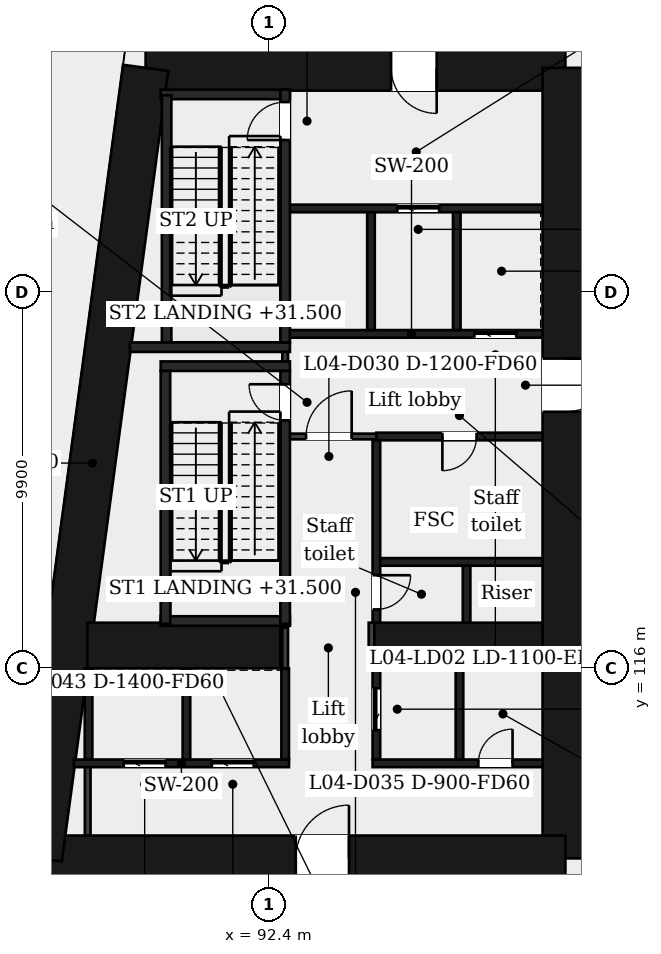
"""IFC4 building model, lengths in metres.
Left out: names, types, materials, properties, quantities, classifications, styles, units other than length and angle.
Written with IfcOpenShell. Run it as: python <this file> out.ifc"""

import sys

from ifc_helpers import new_model, si_unit, direction, frame, frame_2d, origin, place, context, subcontext, project, spatial, rectangle, extrude, element, fill, save


model = new_model("IFC4")
c1 = context("Model", 3, precision=1e-05, world=origin(), true_north=direction((0.0, 1.0)))
c2 = subcontext(c1, "Body", "Model", "MODEL_VIEW")
j1 = project(units=[si_unit("LENGTHUNIT", "METRE"), si_unit("PLANEANGLEUNIT", "RADIAN")], contexts=[c1])
p1 = place(None, origin())
s1 = spatial("IfcSite", under=j1, at=p1, CompositionType="ELEMENT")
p2 = place(p1, origin())
s2 = spatial("IfcBuilding", under=s1, at=p2, CompositionType="ELEMENT")
p3 = place(p2, frame((0.0, 0.0, 29.0)))
s3 = spatial("IfcBuildingStorey", under=s2, at=p3, CompositionType="ELEMENT", Elevation=29.0)
p4 = place(p3, frame((89.156, 131.8, 0.0), z_axis=(0.0, 0.0, 1.0), x_axis=(1.0, 0.0, 0.0)))
e1 = element("IfcWall", 1, at=p4, inside=s3, PredefinedType="SHEAR", context=c2, shape_type="SweptSolid", body=[
    extrude(rectangle(XDim=11.044, YDim=1.2, at=frame_2d((5.522, 0.0))), origin(), (0.0, 0.0, 1.0), 5.0),
])
p5 = place(p4, frame((6.458, 0.0, 0.0)))
e2 = element("IfcOpeningElement", 2, at=p5, cuts=e1, PredefinedType="OPENING", context=c2, shape_type="SweptSolid", body=[
    extrude(rectangle(XDim=1.2, YDim=2.1, at=frame_2d((0.6, 1.05))), frame((0.0, 0.61, 0.0), z_axis=(0.0, -1.0, 0.0), x_axis=(1.0, 0.0, 0.0)), (0.0, 0.0, 1.0), 1.22),
])
p6 = place(p3, frame((100.2, 131.8, 0.0), z_axis=(0.0, 0.0, 1.0), x_axis=(0.0, -1.0, 0.0)))
e3 = element("IfcWall", 3, at=p6, inside=s3, PredefinedType="SHEAR", context=c2, shape_type="SweptSolid", body=[
    extrude(rectangle(XDim=20.8, YDim=1.2, at=frame_2d((10.4, 0.0))), origin(), (0.0, 0.0, 1.0), 5.0),
])
p7 = place(p6, frame((7.65, 0.0, 0.0)))
e4 = element("IfcOpeningElement", 4, at=p7, cuts=e3, PredefinedType="OPENING", context=c2, shape_type="SweptSolid", body=[
    extrude(rectangle(XDim=1.4, YDim=2.1, at=frame_2d((0.7, 1.05))), frame((0.0, 0.61, 0.0), z_axis=(0.0, -1.0, 0.0), x_axis=(1.0, 0.0, 0.0)), (0.0, 0.0, 1.0), 1.22),
])
p8 = place(p3, frame((100.2, 111.0, 0.0), z_axis=(0.0, 0.0, 1.0), x_axis=(-1.0, 0.0, 0.0)))
e5 = element("IfcWall", 5, at=p8, inside=s3, PredefinedType="SHEAR", context=c2, shape_type="SweptSolid", body=[
    extrude(rectangle(XDim=13.844, YDim=1.2, at=frame_2d((6.922, 0.0))), origin(), (0.0, 0.0, 1.0), 5.0),
])
p9 = place(p8, frame((5.694, 0.0, 0.0)))
e6 = element("IfcOpeningElement", 6, at=p9, cuts=e5, PredefinedType="OPENING", context=c2, shape_type="SweptSolid", body=[
    extrude(rectangle(XDim=1.4, YDim=2.1, at=frame_2d((0.7, 1.05))), frame((0.0, 0.61, 0.0), z_axis=(0.0, -1.0, 0.0), x_axis=(1.0, 0.0, 0.0)), (0.0, 0.0, 1.0), 1.22),
])
p10 = place(p3, frame((86.355, 111.0, 0.0), z_axis=(0.0, 0.0, 1.0), x_axis=(0.133413989637, 0.99106039542, 0.0)))
e7 = element("IfcWall", 7, at=p10, inside=s3, PredefinedType="SHEAR", context=c2, shape_type="SweptSolid", body=[
    extrude(rectangle(XDim=20.988, YDim=1.2, at=frame_2d((10.494, 0.0))), origin(), (0.0, 0.0, 1.0), 5.0),
])
p11 = place(p3, frame((87.623, 116.6, 0.0), z_axis=(0.0, 0.0, 1.0), x_axis=(1.0, 0.0, 0.0)))
e8 = element("IfcWall", 8, at=p11, inside=s3, PredefinedType="SHEAR", context=c2, shape_type="SweptSolid", body=[
    extrude(rectangle(XDim=5.077, YDim=1.2, at=frame_2d((2.539, 0.0))), origin(), (0.0, 0.0, 1.0), 5.0),
])
p12 = place(p3, frame((95.1, 116.6, 0.0), z_axis=(0.0, 0.0, 1.0), x_axis=(1.0, 0.0, 0.0)))
e9 = element("IfcWall", 9, at=p12, inside=s3, PredefinedType="SHEAR", context=c2, shape_type="SweptSolid", body=[
    extrude(rectangle(XDim=4.5, YDim=1.2, at=frame_2d((2.25, 0.0))), origin(), (0.0, 0.0, 1.0), 5.0),
])
p13 = place(p3, frame((87.267, 113.5, 0.0), z_axis=(0.0, 0.0, 1.0), x_axis=(1.0, 0.0, 0.0)))
e10 = element("IfcWall", 10, at=p13, inside=s3, PredefinedType="PARTITIONING", context=c2, shape_type="SweptSolid", body=[
    extrude(rectangle(XDim=5.66, YDim=0.2, at=frame_2d((2.83, 0.0))), origin(), (0.0, 0.0, 1.0), 4.4),
])
p14 = place(p13, frame((1.312, 0.0, 0.0)))
e11 = element("IfcOpeningElement", 11, at=p14, cuts=e10, PredefinedType="OPENING", context=c2, shape_type="SweptSolid", body=[
    extrude(rectangle(XDim=1.1, YDim=2.1, at=frame_2d((0.55, 1.05))), frame((0.0, 0.11, 0.0), z_axis=(0.0, -1.0, 0.0), x_axis=(1.0, 0.0, 0.0)), (0.0, 0.0, 1.0), 0.22),
])
p15 = place(p13, frame((3.631, 0.0, 0.0)))
e12 = element("IfcOpeningElement", 12, at=p15, cuts=e10, PredefinedType="OPENING", context=c2, shape_type="SweptSolid", body=[
    extrude(rectangle(XDim=1.1, YDim=2.1, at=frame_2d((0.55, 1.05))), frame((0.0, 0.11, 0.0), z_axis=(0.0, -1.0, 0.0), x_axis=(1.0, 0.0, 0.0)), (0.0, 0.0, 1.0), 0.22),
])
p16 = place(p3, frame((95.127, 113.5, 0.0), z_axis=(0.0, 0.0, 1.0), x_axis=(1.0, 0.0, 0.0)))
e13 = element("IfcWall", 13, at=p16, inside=s3, PredefinedType="PARTITIONING", context=c2, shape_type="SweptSolid", body=[
    extrude(rectangle(XDim=4.473, YDim=0.2, at=frame_2d((2.237, 0.0))), origin(), (0.0, 0.0, 1.0), 4.4),
])
p17 = place(p16, frame((2.783, 0.0, 0.0)))
e14 = element("IfcOpeningElement", 14, at=p17, cuts=e13, PredefinedType="OPENING", context=c2, shape_type="SweptSolid", body=[
    extrude(rectangle(XDim=0.9, YDim=2.1, at=frame_2d((0.45, 1.05))), frame((0.0, 0.11, 0.0), z_axis=(0.0, -1.0, 0.0), x_axis=(1.0, 0.0, 0.0)), (0.0, 0.0, 1.0), 0.22),
])
p18 = place(p3, frame((89.552, 117.245, 0.0), z_axis=(0.0, 0.0, 1.0), x_axis=(1.0, 0.0, 0.0)))
e15 = element("IfcWall", 15, at=p18, inside=s3, PredefinedType="PARTITIONING", context=c2, shape_type="SweptSolid", body=[
    extrude(rectangle(XDim=3.4, YDim=0.25, at=frame_2d((1.7, 0.0))), origin(), (0.0, 0.0, 1.0), 4.4),
])
p19 = place(p3, frame((95.227, 118.8, 0.0), z_axis=(0.0, 0.0, 1.0), x_axis=(1.0, 0.0, 0.0)))
e16 = element("IfcWall", 16, at=p19, inside=s3, PredefinedType="PARTITIONING", context=c2, shape_type="SweptSolid", body=[
    extrude(rectangle(XDim=4.373, YDim=0.2, at=frame_2d((2.187, 0.0))), origin(), (0.0, 0.0, 1.0), 4.4),
])
p20 = place(p3, frame((95.227, 122.1, 0.0), z_axis=(0.0, 0.0, 1.0), x_axis=(1.0, 0.0, 0.0)))
e17 = element("IfcWall", 17, at=p20, inside=s3, PredefinedType="PARTITIONING", context=c2, shape_type="SweptSolid", body=[
    extrude(rectangle(XDim=4.373, YDim=0.2, at=frame_2d((2.187, 0.0))), origin(), (0.0, 0.0, 1.0), 4.4),
])
p21 = place(p20, frame((1.736, 0.0, 0.0)))
e18 = element("IfcOpeningElement", 18, at=p21, cuts=e17, PredefinedType="OPENING", context=c2, shape_type="SweptSolid", body=[
    extrude(rectangle(XDim=0.9, YDim=2.1, at=frame_2d((0.45, 1.05))), frame((0.0, 0.11, 0.0), z_axis=(0.0, -1.0, 0.0), x_axis=(1.0, 0.0, 0.0)), (0.0, 0.0, 1.0), 0.22),
])
p22 = place(p3, frame((92.827, 122.1, 0.0), z_axis=(0.0, 0.0, 1.0), x_axis=(1.0, 0.0, 0.0)))
e19 = element("IfcWall", 19, at=p22, inside=s3, PredefinedType="PARTITIONING", context=c2, shape_type="SweptSolid", body=[
    extrude(rectangle(XDim=2.4, YDim=0.15, at=frame_2d((1.2, 0.0))), origin(), (0.0, 0.0, 1.0), 4.4),
])
p23 = place(p22, frame((0.55, 0.0, 0.0)))
e20 = element("IfcOpeningElement", 20, at=p23, cuts=e19, PredefinedType="OPENING", context=c2, shape_type="SweptSolid", body=[
    extrude(rectangle(XDim=1.2, YDim=2.1, at=frame_2d((0.6, 1.05))), frame((0.0, 0.085, 0.0), z_axis=(0.0, -1.0, 0.0), x_axis=(1.0, 0.0, 0.0)), (0.0, 0.0, 1.0), 0.17),
])
p24 = place(p3, frame((89.552, 123.95, 0.0), z_axis=(0.0, 0.0, 1.0), x_axis=(1.0, 0.0, 0.0)))
e21 = element("IfcWall", 21, at=p24, inside=s3, PredefinedType="PARTITIONING", context=c2, shape_type="SweptSolid", body=[
    extrude(rectangle(XDim=3.4, YDim=0.25, at=frame_2d((1.7, 0.0))), origin(), (0.0, 0.0, 1.0), 4.4),
])
p25 = place(p3, frame((88.741, 124.45, 0.0), z_axis=(0.0, 0.0, 1.0), x_axis=(1.0, 0.0, 0.0)))
e22 = element("IfcWall", 22, at=p25, inside=s3, PredefinedType="PARTITIONING", context=c2, shape_type="SweptSolid", body=[
    extrude(rectangle(XDim=4.21, YDim=0.25, at=frame_2d((2.105, 0.0))), origin(), (0.0, 0.0, 1.0), 4.4),
])
p26 = place(p3, frame((92.702, 124.8, 0.0), z_axis=(0.0, 0.0, 1.0), x_axis=(1.0, 0.0, 0.0)))
e23 = element("IfcWall", 23, at=p26, inside=s3, PredefinedType="PARTITIONING", context=c2, shape_type="SweptSolid", body=[
    extrude(rectangle(XDim=6.898, YDim=0.2, at=frame_2d((3.449, 0.0))), origin(), (0.0, 0.0, 1.0), 4.4),
])
p27 = place(p26, frame((5.105, 0.0, 0.0)))
e24 = element("IfcOpeningElement", 24, at=p27, cuts=e23, PredefinedType="OPENING", context=c2, shape_type="SweptSolid", body=[
    extrude(rectangle(XDim=1.1, YDim=2.1, at=frame_2d((0.55, 1.05))), frame((0.0, 0.11, 0.0), z_axis=(0.0, -1.0, 0.0), x_axis=(1.0, 0.0, 0.0)), (0.0, 0.0, 1.0), 0.22),
])
p28 = place(p3, frame((92.827, 128.1, 0.0), z_axis=(0.0, 0.0, 1.0), x_axis=(1.0, 0.0, 0.0)))
e25 = element("IfcWall", 25, at=p28, inside=s3, PredefinedType="PARTITIONING", context=c2, shape_type="SweptSolid", body=[
    extrude(rectangle(XDim=6.773, YDim=0.2, at=frame_2d((3.387, 0.0))), origin(), (0.0, 0.0, 1.0), 4.4),
])
p29 = place(p28, frame((2.951, 0.0, 0.0)))
e26 = element("IfcOpeningElement", 26, at=p29, cuts=e25, PredefinedType="OPENING", context=c2, shape_type="SweptSolid", body=[
    extrude(rectangle(XDim=1.1, YDim=2.1, at=frame_2d((0.55, 1.05))), frame((0.0, 0.11, 0.0), z_axis=(0.0, -1.0, 0.0), x_axis=(1.0, 0.0, 0.0)), (0.0, 0.0, 1.0), 0.22),
])
p30 = place(p3, frame((89.552, 131.101, 0.0), z_axis=(0.0, 0.0, 1.0), x_axis=(1.0, 0.0, 0.0)))
e27 = element("IfcWall", 27, at=p30, inside=s3, PredefinedType="PARTITIONING", context=c2, shape_type="SweptSolid", body=[
    extrude(rectangle(XDim=3.4, YDim=0.25, at=frame_2d((1.7, 0.0))), origin(), (0.0, 0.0, 1.0), 4.4),
])
p31 = place(p3, frame((87.653, 113.6, 0.0), z_axis=(0.0, 0.0, 1.0), x_axis=(0.0, 1.0, 0.0)))
e28 = element("IfcWall", 28, at=p31, inside=s3, PredefinedType="PARTITIONING", context=c2, shape_type="SweptSolid", body=[
    extrude(rectangle(XDim=2.4, YDim=0.2, at=frame_2d((1.2, 0.0))), origin(), (0.0, 0.0, 1.0), 4.4),
])
p32 = place(p3, frame((87.631, 111.6, 0.0), z_axis=(0.0, 0.0, 1.0), x_axis=(0.0, 1.0, 0.0)))
e29 = element("IfcWall", 29, at=p32, inside=s3, PredefinedType="PARTITIONING", context=c2, shape_type="SweptSolid", body=[
    extrude(rectangle(XDim=1.8, YDim=0.15, at=frame_2d((0.9, 0.0))), origin(), (0.0, 0.0, 1.0), 4.4),
])
p33 = place(p3, frame((89.677, 117.17, 0.0), z_axis=(0.0, 0.0, 1.0), x_axis=(0.0, 1.0, 0.0)))
e30 = element("IfcWall", 30, at=p33, inside=s3, PredefinedType="PARTITIONING", context=c2, shape_type="SweptSolid", body=[
    extrude(rectangle(XDim=6.655, YDim=0.25, at=frame_2d((3.328, 0.0))), origin(), (0.0, 0.0, 1.0), 4.4),
])
p34 = place(p3, frame((89.707, 124.575, 0.0), z_axis=(0.0, 0.0, 1.0), x_axis=(0.0, 1.0, 0.0)))
e31 = element("IfcWall", 31, at=p34, inside=s3, PredefinedType="PARTITIONING", context=c2, shape_type="SweptSolid", body=[
    extrude(rectangle(XDim=6.5, YDim=0.25, at=frame_2d((3.25, 0.0))), origin(), (0.0, 0.0, 1.0), 4.4),
])
for number, where, z_axis, x_axis in (
    (32, (90.229, 113.6, 0.0), (0.0, 0.0, 1.0), (0.0, 1.0, 0.0)),
    (33, (92.827, 113.6, 0.0), (0.0, 0.0, 1.0), (0.0, 1.0, 0.0)),
):
    element("IfcWall", number, at=place(p3, frame(where, z_axis=z_axis, x_axis=x_axis)), inside=s3, PredefinedType="PARTITIONING", context=c2, shape_type="SweptSolid", body=[
        extrude(rectangle(XDim=2.4, YDim=0.2, at=frame_2d((1.2, 0.0))), origin(), (0.0, 0.0, 1.0), 4.4),
    ])
p35 = place(p3, frame((92.827, 116.0, 0.0), z_axis=(0.0, 0.0, 1.0), x_axis=(0.0, 1.0, 0.0)))
e34 = element("IfcWall", 34, at=p35, inside=s3, PredefinedType="PARTITIONING", context=c2, shape_type="SweptSolid", body=[
    extrude(rectangle(XDim=1.075, YDim=0.15, at=frame_2d((0.538, 0.0))), origin(), (0.0, 0.0, 1.0), 4.4),
])
p36 = place(p3, frame((92.827, 124.075, 0.0), z_axis=(0.0, 0.0, 1.0), x_axis=(0.0, 1.0, 0.0)))
e35 = element("IfcWall", 35, at=p36, inside=s3, PredefinedType="PARTITIONING", context=c2, shape_type="SweptSolid", body=[
    extrude(rectangle(XDim=0.25, YDim=0.15, at=frame_2d((0.125, 0.0))), origin(), (0.0, 0.0, 1.0), 4.4),
])
p37 = place(p3, frame((92.827, 117.17, 0.0), z_axis=(0.0, 0.0, 1.0), x_axis=(0.0, 1.0, 0.0)))
e36 = element("IfcWall", 36, at=p37, inside=s3, PredefinedType="PARTITIONING", context=c2, shape_type="SweptSolid", body=[
    extrude(rectangle(XDim=6.655, YDim=0.25, at=frame_2d((3.328, 0.0))), origin(), (0.0, 0.0, 1.0), 4.4),
])
p38 = place(p37, frame((5.355, 0.0, 0.0)))
e37 = element("IfcOpeningElement", 37, at=p38, cuts=e36, PredefinedType="OPENING", context=c2, shape_type="SweptSolid", body=[
    extrude(rectangle(XDim=0.95, YDim=2.1, at=frame_2d((0.475, 1.05))), frame((0.0, 0.135, 0.0), z_axis=(0.0, -1.0, 0.0), x_axis=(1.0, 0.0, 0.0)), (0.0, 0.0, 1.0), 0.27),
])
p39 = place(p3, frame((92.827, 124.575, 0.0), z_axis=(0.0, 0.0, 1.0), x_axis=(0.0, 1.0, 0.0)))
e38 = element("IfcWall", 38, at=p39, inside=s3, PredefinedType="PARTITIONING", context=c2, shape_type="SweptSolid", body=[
    extrude(rectangle(XDim=6.655, YDim=0.25, at=frame_2d((3.328, 0.0))), origin(), (0.0, 0.0, 1.0), 4.4),
])
p40 = place(p39, frame((5.325, 0.0, 0.0)))
e39 = element("IfcOpeningElement", 39, at=p40, cuts=e38, PredefinedType="OPENING", context=c2, shape_type="SweptSolid", body=[
    extrude(rectangle(XDim=1.0, YDim=2.1, at=frame_2d((0.5, 1.05))), frame((0.0, 0.135, 0.0), z_axis=(0.0, -1.0, 0.0), x_axis=(1.0, 0.0, 0.0)), (0.0, 0.0, 1.0), 0.27),
])
p41 = place(p3, frame((95.085, 124.9, 0.0), z_axis=(0.0, 0.0, 1.0), x_axis=(0.0, 1.0, 0.0)))
e40 = element("IfcWall", 40, at=p41, inside=s3, PredefinedType="PARTITIONING", context=c2, shape_type="SweptSolid", body=[
    extrude(rectangle(XDim=3.1, YDim=0.2, at=frame_2d((1.55, 0.0))), origin(), (0.0, 0.0, 1.0), 4.4),
])
p42 = place(p3, frame((95.1, 116.0, 0.0), z_axis=(0.0, 0.0, 1.0), x_axis=(0.0, 1.0, 0.0)))
e41 = element("IfcWall", 41, at=p42, inside=s3, PredefinedType="PARTITIONING", context=c2, shape_type="SweptSolid", body=[
    extrude(rectangle(XDim=1.2, YDim=0.15, at=frame_2d((0.6, 0.0))), origin(), (0.0, 0.0, 1.0), 4.4),
])
p43 = place(p3, frame((95.227, 113.6, 0.0), z_axis=(0.0, 0.0, 1.0), x_axis=(0.0, 1.0, 0.0)))
e42 = element("IfcWall", 42, at=p43, inside=s3, PredefinedType="PARTITIONING", context=c2, shape_type="SweptSolid", body=[
    extrude(rectangle(XDim=2.4, YDim=0.2, at=frame_2d((1.2, 0.0))), origin(), (0.0, 0.0, 1.0), 4.4),
])
p44 = place(p43, frame((0.775, 0.0, 0.0)))
e43 = element("IfcOpeningElement", 43, at=p44, cuts=e42, PredefinedType="OPENING", context=c2, shape_type="SweptSolid", body=[
    extrude(rectangle(XDim=1.1, YDim=2.1, at=frame_2d((0.55, 1.05))), frame((0.0, 0.11, 0.0), z_axis=(0.0, -1.0, 0.0), x_axis=(1.0, 0.0, 0.0)), (0.0, 0.0, 1.0), 0.22),
])
p45 = place(p3, frame((95.227, 117.2, 0.0), z_axis=(0.0, 0.0, 1.0), x_axis=(0.0, 1.0, 0.0)))
e44 = element("IfcWall", 44, at=p45, inside=s3, PredefinedType="PARTITIONING", context=c2, shape_type="SweptSolid", body=[
    extrude(rectangle(XDim=4.8, YDim=0.2, at=frame_2d((2.4, 0.0))), origin(), (0.0, 0.0, 1.0), 4.4),
])
p46 = place(p45, frame((0.35, 0.0, 0.0)))
e45 = element("IfcOpeningElement", 45, at=p46, cuts=e44, PredefinedType="OPENING", context=c2, shape_type="SweptSolid", body=[
    extrude(rectangle(XDim=0.9, YDim=2.1, at=frame_2d((0.45, 1.05))), frame((0.0, 0.11, 0.0), z_axis=(0.0, -1.0, 0.0), x_axis=(1.0, 0.0, 0.0)), (0.0, 0.0, 1.0), 0.22),
])
p47 = place(p3, frame((97.342, 124.9, 0.0), z_axis=(0.0, 0.0, 1.0), x_axis=(0.0, 1.0, 0.0)))
e46 = element("IfcWall", 46, at=p47, inside=s3, PredefinedType="PARTITIONING", context=c2, shape_type="SweptSolid", body=[
    extrude(rectangle(XDim=3.1, YDim=0.2, at=frame_2d((1.55, 0.0))), origin(), (0.0, 0.0, 1.0), 4.4),
])
p48 = place(p3, frame((97.414, 113.6, 0.0), z_axis=(0.0, 0.0, 1.0), x_axis=(0.0, 1.0, 0.0)))
e47 = element("IfcWall", 47, at=p48, inside=s3, PredefinedType="PARTITIONING", context=c2, shape_type="SweptSolid", body=[
    extrude(rectangle(XDim=2.4, YDim=0.2, at=frame_2d((1.2, 0.0))), origin(), (0.0, 0.0, 1.0), 4.4),
])
p49 = place(p3, frame((97.6, 117.2, 0.0), z_axis=(0.0, 0.0, 1.0), x_axis=(0.0, 1.0, 0.0)))
e48 = element("IfcWall", 48, at=p49, inside=s3, PredefinedType="PARTITIONING", context=c2, shape_type="SweptSolid", body=[
    extrude(rectangle(XDim=1.5, YDim=0.2, at=frame_2d((0.75, 0.0))), origin(), (0.0, 0.0, 1.0), 4.4),
])
p50 = place(p23, origin())
e49 = element("IfcDoor", 49, at=p50, inside=s3, OperationType="SINGLE_SWING_RIGHT", PredefinedType="DOOR", context=c2, shape_type="SweptSolid", body=[
    extrude(rectangle(XDim=1.2, YDim=2.1, at=frame_2d((0.6, 1.05))), frame((0.0, 0.025, 0.0), z_axis=(0.0, -1.0, 0.0), x_axis=(1.0, 0.0, 0.0)), (0.0, 0.0, 1.0), 0.05),
])
fill(e20, e49)
p51 = place(p29, origin())
e50 = element("IfcDoor", 50, at=p51, inside=s3, OperationType="SLIDING_TO_LEFT", PredefinedType="DOOR", context=c2, shape_type="SweptSolid", body=[
    extrude(rectangle(XDim=1.1, YDim=2.1, at=frame_2d((0.55, 1.05))), frame((0.0, 0.025, 0.0), z_axis=(0.0, -1.0, 0.0), x_axis=(1.0, 0.0, 0.0)), (0.0, 0.0, 1.0), 0.05),
])
fill(e26, e50)
p52 = place(p27, origin())
e51 = element("IfcDoor", 51, at=p52, inside=s3, OperationType="SLIDING_TO_LEFT", PredefinedType="DOOR", context=c2, shape_type="SweptSolid", body=[
    extrude(rectangle(XDim=1.1, YDim=2.1, at=frame_2d((0.55, 1.05))), frame((0.0, 0.025, 0.0), z_axis=(0.0, -1.0, 0.0), x_axis=(1.0, 0.0, 0.0)), (0.0, 0.0, 1.0), 0.05),
])
fill(e24, e51)
p53 = place(p21, origin())
e52 = element("IfcDoor", 52, at=p53, inside=s3, OperationType="SINGLE_SWING_LEFT", PredefinedType="DOOR", context=c2, shape_type="SweptSolid", body=[
    extrude(rectangle(XDim=0.9, YDim=2.1, at=frame_2d((0.45, 1.05))), frame((0.0, 0.025, 0.0), z_axis=(0.0, -1.0, 0.0), x_axis=(1.0, 0.0, 0.0)), (0.0, 0.0, 1.0), 0.05),
])
fill(e18, e52)
p54 = place(p38, origin())
e53 = element("IfcDoor", 53, at=p54, inside=s3, OperationType="SINGLE_SWING_RIGHT", PredefinedType="DOOR", context=c2, shape_type="SweptSolid", body=[
    extrude(rectangle(XDim=0.95, YDim=2.1, at=frame_2d((0.475, 1.05))), frame((0.0, 0.025, 0.0), z_axis=(0.0, -1.0, 0.0), x_axis=(1.0, 0.0, 0.0)), (0.0, 0.0, 1.0), 0.05),
])
fill(e37, e53)
p55 = place(p40, origin())
e54 = element("IfcDoor", 54, at=p55, inside=s3, OperationType="SINGLE_SWING_LEFT", PredefinedType="DOOR", context=c2, shape_type="SweptSolid", body=[
    extrude(rectangle(XDim=1.0, YDim=2.1, at=frame_2d((0.5, 1.05))), frame((0.0, 0.025, 0.0), z_axis=(0.0, -1.0, 0.0), x_axis=(1.0, 0.0, 0.0)), (0.0, 0.0, 1.0), 0.05),
])
fill(e39, e54)
p56 = place(p46, origin())
e55 = element("IfcDoor", 55, at=p56, inside=s3, OperationType="SINGLE_SWING_RIGHT", PredefinedType="DOOR", context=c2, shape_type="SweptSolid", body=[
    extrude(rectangle(XDim=0.9, YDim=2.1, at=frame_2d((0.45, 1.05))), frame((0.0, 0.025, 0.0), z_axis=(0.0, -1.0, 0.0), x_axis=(1.0, 0.0, 0.0)), (0.0, 0.0, 1.0), 0.05),
])
fill(e45, e55)
p57 = place(p14, origin())
e56 = element("IfcDoor", 56, at=p57, inside=s3, OperationType="SLIDING_TO_LEFT", PredefinedType="DOOR", context=c2, shape_type="SweptSolid", body=[
    extrude(rectangle(XDim=1.1, YDim=2.1, at=frame_2d((0.55, 1.05))), frame((0.0, 0.025, 0.0), z_axis=(0.0, -1.0, 0.0), x_axis=(1.0, 0.0, 0.0)), (0.0, 0.0, 1.0), 0.05),
])
fill(e11, e56)
p58 = place(p15, origin())
e57 = element("IfcDoor", 57, at=p58, inside=s3, OperationType="SLIDING_TO_LEFT", PredefinedType="DOOR", context=c2, shape_type="SweptSolid", body=[
    extrude(rectangle(XDim=1.1, YDim=2.1, at=frame_2d((0.55, 1.05))), frame((0.0, 0.025, 0.0), z_axis=(0.0, -1.0, 0.0), x_axis=(1.0, 0.0, 0.0)), (0.0, 0.0, 1.0), 0.05),
])
fill(e12, e57)
p59 = place(p44, origin())
e58 = element("IfcDoor", 58, at=p59, inside=s3, OperationType="SLIDING_TO_LEFT", PredefinedType="DOOR", context=c2, shape_type="SweptSolid", body=[
    extrude(rectangle(XDim=1.1, YDim=2.1, at=frame_2d((0.55, 1.05))), frame((0.0, 0.025, 0.0), z_axis=(0.0, -1.0, 0.0), x_axis=(1.0, 0.0, 0.0)), (0.0, 0.0, 1.0), 0.05),
])
fill(e43, e58)
p60 = place(p17, origin())
e59 = element("IfcDoor", 59, at=p60, inside=s3, OperationType="SINGLE_SWING_RIGHT", PredefinedType="DOOR", context=c2, shape_type="SweptSolid", body=[
    extrude(rectangle(XDim=0.9, YDim=2.1, at=frame_2d((0.45, 1.05))), frame((0.0, 0.025, 0.0), z_axis=(0.0, -1.0, 0.0), x_axis=(1.0, 0.0, 0.0)), (0.0, 0.0, 1.0), 0.05),
])
fill(e14, e59)
p61 = place(p9, origin())
e60 = element("IfcDoor", 60, at=p61, inside=s3, OperationType="SINGLE_SWING_LEFT", PredefinedType="DOOR", context=c2, shape_type="SweptSolid", body=[
    extrude(rectangle(XDim=1.4, YDim=2.1, at=frame_2d((0.7, 1.05))), frame((0.0, 0.025, 0.0), z_axis=(0.0, -1.0, 0.0), x_axis=(1.0, 0.0, 0.0)), (0.0, 0.0, 1.0), 0.05),
])
fill(e6, e60)
p62 = place(p5, origin())
e61 = element("IfcDoor", 61, at=p62, inside=s3, OperationType="SINGLE_SWING_RIGHT", PredefinedType="DOOR", context=c2, shape_type="SweptSolid", body=[
    extrude(rectangle(XDim=1.2, YDim=2.1, at=frame_2d((0.6, 1.05))), frame((0.0, 0.025, 0.0), z_axis=(0.0, -1.0, 0.0), x_axis=(1.0, 0.0, 0.0)), (0.0, 0.0, 1.0), 0.05),
])
fill(e2, e61)
p63 = place(p7, origin())
e62 = element("IfcDoor", 62, at=p63, inside=s3, OperationType="SINGLE_SWING_LEFT", PredefinedType="DOOR", context=c2, shape_type="SweptSolid", body=[
    extrude(rectangle(XDim=1.4, YDim=2.1, at=frame_2d((0.7, 1.05))), frame((0.0, 0.025, 0.0), z_axis=(0.0, -1.0, 0.0), x_axis=(1.0, 0.0, 0.0)), (0.0, 0.0, 1.0), 0.05),
])
fill(e4, e62)
save(model, sys.argv[1])
